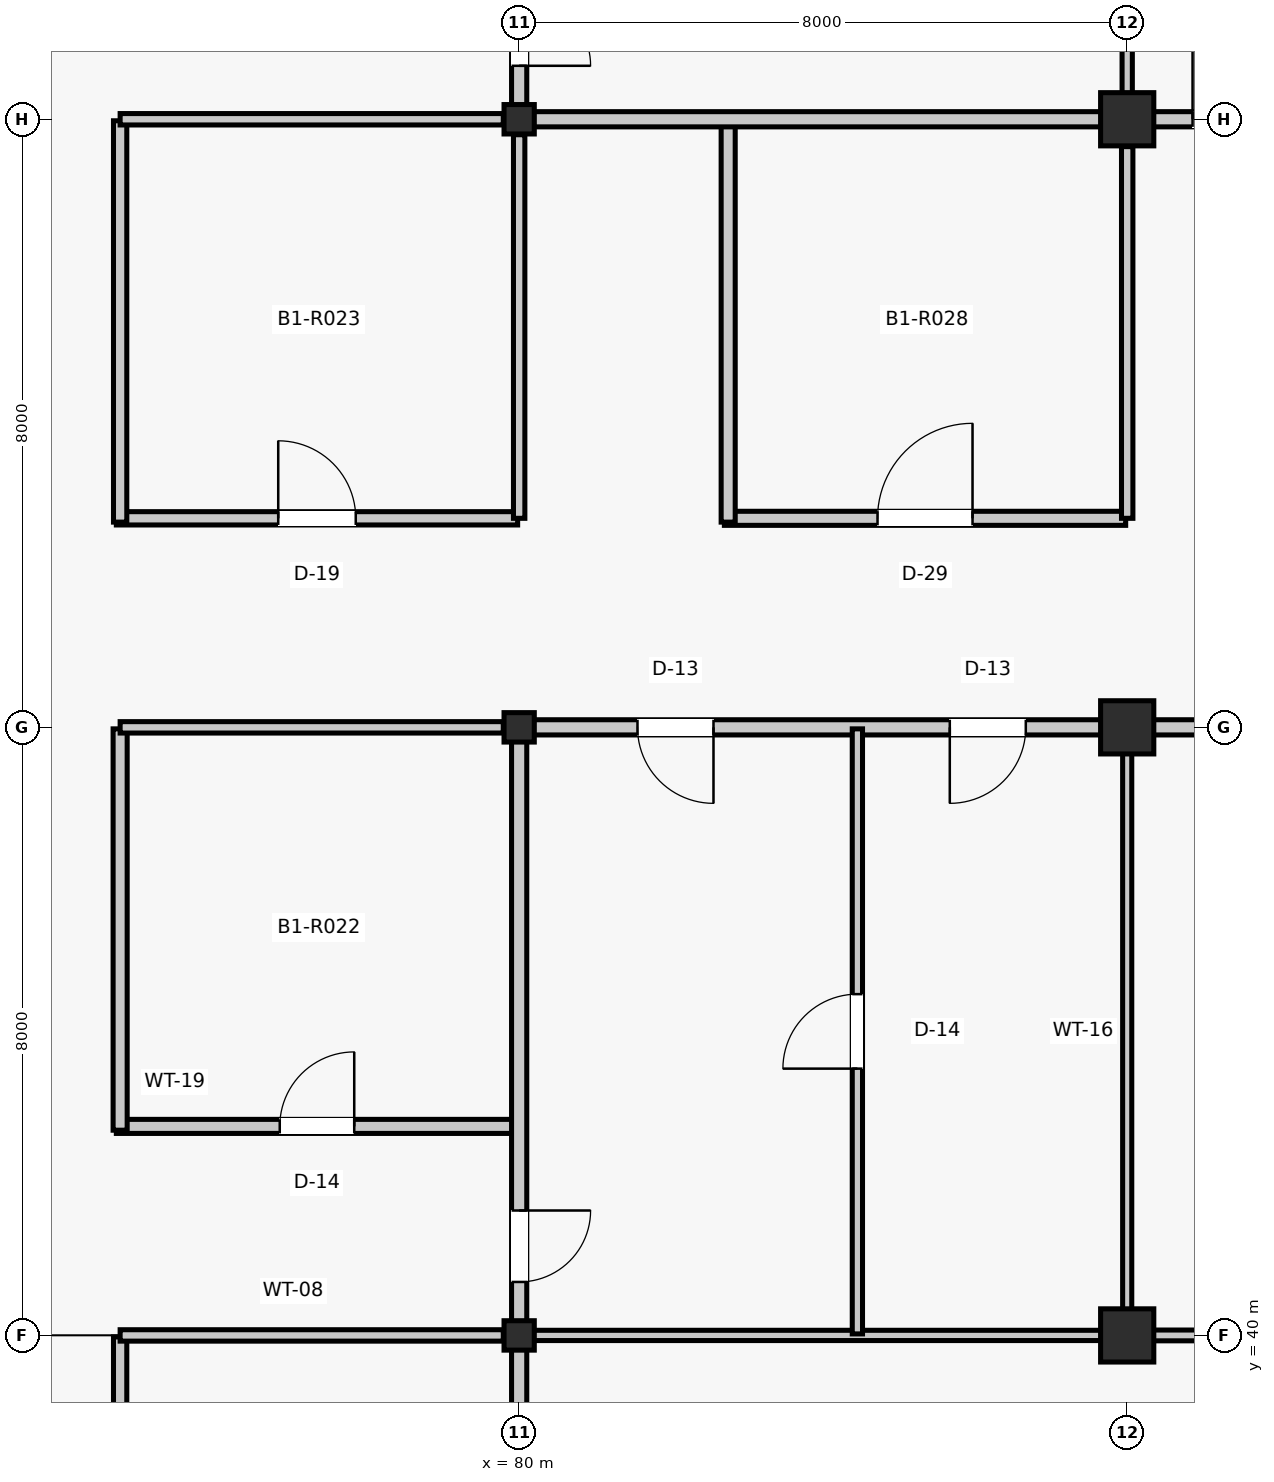
"""IFC4 building model, lengths in metres.
Left out: names, types, materials, properties, quantities, classifications, styles, units other than length and angle.
Written with IfcOpenShell. Run it as: python <this file> out.ifc"""

import sys

from ifc_helpers import new_model, si_unit, direction, frame, frame_2d, origin, origin_2d, place, context, subcontext, project, spatial, rectangle, i_section, extrude, element, fill, save


model = new_model("IFC4")
c1 = context("Model", 3, precision=1e-05, world=origin(), true_north=direction((0.0, 1.0)))
c2 = subcontext(c1, "Body", "Model", "MODEL_VIEW")
j1 = project(units=[si_unit("LENGTHUNIT", "METRE"), si_unit("PLANEANGLEUNIT", "RADIAN")], contexts=[c1])
p1 = place(None, origin())
s1 = spatial("IfcSite", under=j1, at=p1, CompositionType="ELEMENT")
p2 = place(p1, origin())
s2 = spatial("IfcBuilding", under=s1, at=p2, CompositionType="ELEMENT")
p3 = place(p2, frame((0.0, 0.0, -4.29)))
s3 = spatial("IfcBuildingStorey", under=s2, at=p3, CompositionType="ELEMENT", Elevation=-4.29)
for number, where, z_axis, x_axis in (
    (1, (80.0, 40.0, 0.0), (0.0, 0.0, 1.0), (1.0, 0.0, 0.0)),
    (2, (80.0, 48.0, 0.0), (0.0, 0.0, 1.0), (1.0, 0.0, 0.0)),
    (3, (80.0, 56.0, 0.0), (0.0, 0.0, 1.0), (1.0, 0.0, 0.0)),
):
    element("IfcColumn", number, at=place(p3, frame(where, z_axis=z_axis, x_axis=x_axis)), inside=s3, PredefinedType="COLUMN", context=c2, shape_type="SweptSolid", body=[
        extrude(i_section(OverallWidth=0.398, OverallDepth=0.387, WebThickness=0.021, FlangeThickness=0.033, FilletRadius=0.015, at=origin_2d()), origin(), (0.0, 0.0, 1.0), 4.29),
    ])
for number, where, z_axis, x_axis in (
    (4, (88.0, 40.0, 0.0), (0.0, 0.0, 1.0), (1.0, 0.0, 0.0)),
    (5, (88.0, 48.0, 0.0), (0.0, 0.0, 1.0), (1.0, 0.0, 0.0)),
    (6, (88.0, 56.0, 0.0), (0.0, 0.0, 1.0), (1.0, 0.0, 0.0)),
):
    element("IfcColumn", number, at=place(p3, frame(where, z_axis=z_axis, x_axis=x_axis)), inside=s3, PredefinedType="COLUMN", context=c2, shape_type="SweptSolid", body=[
        extrude(rectangle(XDim=0.7, YDim=0.7, at=origin_2d()), origin(), (0.0, 0.0, 1.0), 4.29),
    ])
p4 = place(p3, frame((74.75, 34.7, 0.0), z_axis=(0.0, 0.0, 1.0), x_axis=(0.0, 1.0, 0.0)))
e7 = element("IfcWall", 7, at=p4, inside=s3, PredefinedType="PARTITIONING", context=c2, shape_type="SweptSolid", body=[
    extrude(rectangle(XDim=5.28, YDim=0.175, at=frame_2d((2.64, 0.0))), origin(), (0.0, 0.0, 1.0), 3.326),
])
p5 = place(p3, frame((74.75, 40.0, 0.0), z_axis=(0.0, 0.0, 1.0), x_axis=(1.0, 0.0, 0.0)))
e8 = element("IfcWall", 8, at=p5, inside=s3, PredefinedType="PARTITIONING", context=c2, shape_type="SweptSolid", body=[
    extrude(rectangle(XDim=5.041, YDim=0.15, at=frame_2d((2.521, 0.0))), origin(), (0.0, 0.0, 1.0), 3.326),
])
p6 = place(p3, frame((74.7, 42.75, 0.0), z_axis=(0.0, 0.0, 1.0), x_axis=(1.0, 0.0, 0.0)))
e9 = element("IfcWall", 9, at=p6, inside=s3, PredefinedType="PARTITIONING", context=c2, shape_type="SweptSolid", body=[
    extrude(rectangle(XDim=5.28, YDim=0.185, at=frame_2d((2.64, 0.0))), origin(), (0.0, 0.0, 1.0), 3.461),
])
p7 = place(p6, frame((2.15, 0.0, 0.0)))
e10 = element("IfcOpeningElement", 10, at=p7, cuts=e9, PredefinedType="OPENING", context=c2, shape_type="SweptSolid", body=[
    extrude(rectangle(XDim=0.98, YDim=2.15, at=frame_2d((0.49, 1.075))), frame((0.0, 0.103, 0.0), z_axis=(0.0, -1.0, 0.0), x_axis=(1.0, 0.0, 0.0)), (0.0, 0.0, 1.0), 0.205),
])
p8 = place(p3, frame((74.75, 42.7, 0.0), z_axis=(0.0, 0.0, 1.0), x_axis=(0.0, 1.0, 0.0)))
e11 = element("IfcWall", 11, at=p8, inside=s3, PredefinedType="PARTITIONING", context=c2, shape_type="SweptSolid", body=[
    extrude(rectangle(XDim=5.28, YDim=0.185, at=frame_2d((2.64, 0.0))), origin(), (0.0, 0.0, 1.0), 3.394),
])
p9 = place(p3, frame((74.75, 48.0, 0.0), z_axis=(0.0, 0.0, 1.0), x_axis=(1.0, 0.0, 0.0)))
e12 = element("IfcWall", 12, at=p9, inside=s3, PredefinedType="PARTITIONING", context=c2, shape_type="SweptSolid", body=[
    extrude(rectangle(XDim=5.041, YDim=0.15, at=frame_2d((2.521, 0.0))), origin(), (0.0, 0.0, 1.0), 3.394),
])
p10 = place(p3, frame((74.7, 50.75, 0.0), z_axis=(0.0, 0.0, 1.0), x_axis=(1.0, 0.0, 0.0)))
e13 = element("IfcWall", 13, at=p10, inside=s3, PredefinedType="PARTITIONING", context=c2, shape_type="SweptSolid", body=[
    extrude(rectangle(XDim=5.28, YDim=0.175, at=frame_2d((2.64, 0.0))), origin(), (0.0, 0.0, 1.0), 3.393),
])
p11 = place(p10, frame((2.13, 0.0, 0.0)))
e14 = element("IfcOpeningElement", 14, at=p11, cuts=e13, PredefinedType="OPENING", context=c2, shape_type="SweptSolid", body=[
    extrude(rectangle(XDim=1.02, YDim=2.2, at=frame_2d((0.51, 1.1))), frame((0.0, 0.097, 0.0), z_axis=(0.0, -1.0, 0.0), x_axis=(1.0, 0.0, 0.0)), (0.0, 0.0, 1.0), 0.195),
])
p12 = place(p3, frame((74.75, 50.7, 0.0), z_axis=(0.0, 0.0, 1.0), x_axis=(0.0, 1.0, 0.0)))
e15 = element("IfcWall", 15, at=p12, inside=s3, PredefinedType="PARTITIONING", context=c2, shape_type="SweptSolid", body=[
    extrude(rectangle(XDim=5.28, YDim=0.175, at=frame_2d((2.64, 0.0))), origin(), (0.0, 0.0, 1.0), 3.317),
])
p13 = place(p3, frame((74.75, 56.0, 0.0), z_axis=(0.0, 0.0, 1.0), x_axis=(1.0, 0.0, 0.0)))
e16 = element("IfcWall", 16, at=p13, inside=s3, PredefinedType="PARTITIONING", context=c2, shape_type="SweptSolid", body=[
    extrude(rectangle(XDim=5.041, YDim=0.15, at=frame_2d((2.521, 0.0))), origin(), (0.0, 0.0, 1.0), 3.317),
])
p14 = place(p3, frame((80.0, 50.75, 0.0), z_axis=(0.0, 0.0, 1.0), x_axis=(0.0, 1.0, 0.0)))
e17 = element("IfcWall", 17, at=p14, inside=s3, PredefinedType="PARTITIONING", context=c2, shape_type="SweptSolid", body=[
    extrude(rectangle(XDim=5.046, YDim=0.15, at=frame_2d((2.523, 0.0))), origin(), (0.0, 0.0, 1.0), 3.393),
])
p15 = place(p3, frame((82.7, 50.75, 0.0), z_axis=(0.0, 0.0, 1.0), x_axis=(1.0, 0.0, 0.0)))
e18 = element("IfcWall", 18, at=p15, inside=s3, PredefinedType="PARTITIONING", context=c2, shape_type="SweptSolid", body=[
    extrude(rectangle(XDim=5.28, YDim=0.185, at=frame_2d((2.64, 0.0))), origin(), (0.0, 0.0, 1.0), 3.402),
])
p16 = place(p15, frame((2.015, 0.0, 0.0)))
e19 = element("IfcOpeningElement", 19, at=p16, cuts=e18, PredefinedType="OPENING", context=c2, shape_type="SweptSolid", body=[
    extrude(rectangle(XDim=1.25, YDim=2.18, at=frame_2d((0.625, 1.09))), frame((0.0, 0.103, 0.0), z_axis=(0.0, -1.0, 0.0), x_axis=(1.0, 0.0, 0.0)), (0.0, 0.0, 1.0), 0.205),
])
p17 = place(p3, frame((82.75, 50.7, 0.0), z_axis=(0.0, 0.0, 1.0), x_axis=(0.0, 1.0, 0.0)))
e20 = element("IfcWall", 20, at=p17, inside=s3, PredefinedType="PARTITIONING", context=c2, shape_type="SweptSolid", body=[
    extrude(rectangle(XDim=5.28, YDim=0.185, at=frame_2d((2.64, 0.0))), origin(), (0.0, 0.0, 1.0), 3.393),
])
p18 = place(p3, frame((88.0, 50.75, 0.0), z_axis=(0.0, 0.0, 1.0), x_axis=(0.0, 1.0, 0.0)))
e21 = element("IfcWall", 21, at=p18, inside=s3, PredefinedType="PARTITIONING", context=c2, shape_type="SweptSolid", body=[
    extrude(rectangle(XDim=4.89, YDim=0.15, at=frame_2d((2.445, 0.0))), origin(), (0.0, 0.0, 1.0), 3.402),
])
p19 = place(p3, frame((80.0, 32.184, 0.0), z_axis=(0.0, 0.0, 1.0), x_axis=(0.0, 1.0, 0.0)))
e22 = element("IfcWall", 22, at=p19, inside=s3, PredefinedType="PARTITIONING", context=c2, shape_type="SweptSolid", body=[
    extrude(rectangle(XDim=7.633, YDim=0.2, at=frame_2d((3.816, 0.0))), origin(), (0.0, 0.0, 1.0), 3.394),
])
p20 = place(p19, frame((0.52, 0.0, 0.0)))
e23 = element("IfcOpeningElement", 23, at=p20, cuts=e22, PredefinedType="OPENING", context=c2, shape_type="SweptSolid", body=[
    extrude(rectangle(XDim=0.94, YDim=2.12, at=frame_2d((0.47, 1.06))), frame((0.0, 0.11, 0.0), z_axis=(0.0, -1.0, 0.0), x_axis=(1.0, 0.0, 0.0)), (0.0, 0.0, 1.0), 0.22),
])
p21 = place(p3, frame((80.0, 40.184, 0.0), z_axis=(0.0, 0.0, 1.0), x_axis=(0.0, 1.0, 0.0)))
e24 = element("IfcWall", 24, at=p21, inside=s3, PredefinedType="PARTITIONING", context=c2, shape_type="SweptSolid", body=[
    extrude(rectangle(XDim=7.633, YDim=0.2, at=frame_2d((3.816, 0.0))), origin(), (0.0, 0.0, 1.0), 3.461),
])
p22 = place(p21, frame((0.52, 0.0, 0.0)))
e25 = element("IfcOpeningElement", 25, at=p22, cuts=e24, PredefinedType="OPENING", context=c2, shape_type="SweptSolid", body=[
    extrude(rectangle(XDim=0.94, YDim=2.12, at=frame_2d((0.47, 1.06))), frame((0.0, 0.11, 0.0), z_axis=(0.0, -1.0, 0.0), x_axis=(1.0, 0.0, 0.0)), (0.0, 0.0, 1.0), 0.22),
])
p23 = place(p3, frame((80.0, 56.184, 0.0), z_axis=(0.0, 0.0, 1.0), x_axis=(0.0, 1.0, 0.0)))
e26 = element("IfcWall", 26, at=p23, inside=s3, PredefinedType="PARTITIONING", context=c2, shape_type="SweptSolid", body=[
    extrude(rectangle(XDim=7.633, YDim=0.2, at=frame_2d((3.816, 0.0))), origin(), (0.0, 0.0, 1.0), 3.402),
])
p24 = place(p23, frame((0.52, 0.0, 0.0)))
e27 = element("IfcOpeningElement", 27, at=p24, cuts=e26, PredefinedType="OPENING", context=c2, shape_type="SweptSolid", body=[
    extrude(rectangle(XDim=0.94, YDim=2.12, at=frame_2d((0.47, 1.06))), frame((0.0, 0.11, 0.0), z_axis=(0.0, -1.0, 0.0), x_axis=(1.0, 0.0, 0.0)), (0.0, 0.0, 1.0), 0.22),
])
p25 = place(p3, frame((80.189, 40.0, 0.0), z_axis=(0.0, 0.0, 1.0), x_axis=(1.0, 0.0, 0.0)))
e28 = element("IfcWall", 28, at=p25, inside=s3, PredefinedType="PARTITIONING", context=c2, shape_type="SweptSolid", body=[
    extrude(rectangle(XDim=7.471, YDim=0.135, at=frame_2d((3.735, 0.0))), origin(), (0.0, 0.0, 1.0), 3.394),
])
p26 = place(p3, frame((88.0, 40.34, 0.0), z_axis=(0.0, 0.0, 1.0), x_axis=(0.0, 1.0, 0.0)))
e29 = element("IfcWall", 29, at=p26, inside=s3, PredefinedType="PARTITIONING", context=c2, shape_type="SweptSolid", body=[
    extrude(rectangle(XDim=7.32, YDim=0.12, at=frame_2d((3.66, 0.0))), origin(), (0.0, 0.0, 1.0), 3.393),
])
p27 = place(p3, frame((80.189, 48.0, 0.0), z_axis=(0.0, 0.0, 1.0), x_axis=(1.0, 0.0, 0.0)))
e30 = element("IfcWall", 30, at=p27, inside=s3, PredefinedType="PARTITIONING", context=c2, shape_type="SweptSolid", body=[
    extrude(rectangle(XDim=7.471, YDim=0.2, at=frame_2d((3.735, 0.0))), origin(), (0.0, 0.0, 1.0), 3.317),
])
p28 = place(p27, frame((1.368, 0.0, 0.0)))
e31 = element("IfcOpeningElement", 31, at=p28, cuts=e30, PredefinedType="OPENING", context=c2, shape_type="SweptSolid", body=[
    extrude(rectangle(XDim=1.0, YDim=2.15, at=frame_2d((0.5, 1.075))), frame((0.0, 0.11, 0.0), z_axis=(0.0, -1.0, 0.0), x_axis=(1.0, 0.0, 0.0)), (0.0, 0.0, 1.0), 0.22),
])
p29 = place(p27, frame((5.477, 0.0, 0.0)))
e32 = element("IfcOpeningElement", 32, at=p29, cuts=e30, PredefinedType="OPENING", context=c2, shape_type="SweptSolid", body=[
    extrude(rectangle(XDim=1.0, YDim=2.15, at=frame_2d((0.5, 1.075))), frame((0.0, 0.11, 0.0), z_axis=(0.0, -1.0, 0.0), x_axis=(1.0, 0.0, 0.0)), (0.0, 0.0, 1.0), 0.22),
])
p30 = place(p3, frame((80.189, 56.0, 0.0), z_axis=(0.0, 0.0, 1.0), x_axis=(1.0, 0.0, 0.0)))
e33 = element("IfcWall", 33, at=p30, inside=s3, PredefinedType="PARTITIONING", context=c2, shape_type="SweptSolid", body=[
    extrude(rectangle(XDim=7.471, YDim=0.2, at=frame_2d((3.735, 0.0))), origin(), (0.0, 0.0, 1.0), 3.393),
])
p31 = place(p3, frame((88.0, 56.34, 0.0), z_axis=(0.0, 0.0, 1.0), x_axis=(0.0, 1.0, 0.0)))
e34 = element("IfcWall", 34, at=p31, inside=s3, PredefinedType="PARTITIONING", context=c2, shape_type="SweptSolid", body=[
    extrude(rectangle(XDim=7.32, YDim=0.135, at=frame_2d((3.66, 0.0))), origin(), (0.0, 0.0, 1.0), 3.394),
])
p32 = place(p3, frame((88.34, 40.0, 0.0), z_axis=(0.0, 0.0, 1.0), x_axis=(1.0, 0.0, 0.0)))
e35 = element("IfcWall", 35, at=p32, inside=s3, PredefinedType="PARTITIONING", context=c2, shape_type="SweptSolid", body=[
    extrude(rectangle(XDim=7.471, YDim=0.142, at=frame_2d((3.735, 0.0))), origin(), (0.0, 0.0, 1.0), 3.317),
])
p33 = place(p3, frame((88.34, 48.0, 0.0), z_axis=(0.0, 0.0, 1.0), x_axis=(1.0, 0.0, 0.0)))
e36 = element("IfcWall", 36, at=p33, inside=s3, PredefinedType="PARTITIONING", context=c2, shape_type="SweptSolid", body=[
    extrude(rectangle(XDim=7.471, YDim=0.2, at=frame_2d((3.735, 0.0))), origin(), (0.0, 0.0, 1.0), 3.393),
])
p34 = place(p33, frame((3.085, 0.0, 0.0)))
e37 = element("IfcOpeningElement", 37, at=p34, cuts=e36, PredefinedType="OPENING", context=c2, shape_type="SweptSolid", body=[
    extrude(rectangle(XDim=1.3, YDim=2.2, at=frame_2d((0.65, 1.1))), frame((0.0, 0.11, 0.0), z_axis=(0.0, -1.0, 0.0), x_axis=(1.0, 0.0, 0.0)), (0.0, 0.0, 1.0), 0.22),
])
p35 = place(p3, frame((88.34, 56.0, 0.0), z_axis=(0.0, 0.0, 1.0), x_axis=(1.0, 0.0, 0.0)))
e38 = element("IfcWall", 38, at=p35, inside=s3, PredefinedType="PARTITIONING", context=c2, shape_type="SweptSolid", body=[
    extrude(rectangle(XDim=7.471, YDim=0.2, at=frame_2d((3.735, 0.0))), origin(), (0.0, 0.0, 1.0), 3.326),
])
p36 = place(p35, frame((0.52, 0.0, 0.0)))
e39 = element("IfcOpeningElement", 39, at=p36, cuts=e38, PredefinedType="OPENING", context=c2, shape_type="SweptSolid", body=[
    extrude(rectangle(XDim=0.94, YDim=2.12, at=frame_2d((0.47, 1.06))), frame((0.0, 0.11, 0.0), z_axis=(0.0, -1.0, 0.0), x_axis=(1.0, 0.0, 0.0)), (0.0, 0.0, 1.0), 0.22),
])
p37 = place(p3, frame((84.45, 40.02, 0.0), z_axis=(0.0, 0.0, 1.0), x_axis=(0.0, 1.0, 0.0)))
e40 = element("IfcWall", 40, at=p37, inside=s3, PredefinedType="PARTITIONING", context=c2, shape_type="SweptSolid", body=[
    extrude(rectangle(XDim=7.96, YDim=0.135, at=frame_2d((3.98, 0.0))), origin(), (0.0, 0.0, 1.0), 3.317),
])
p38 = place(p37, frame((3.49, 0.0, 0.0)))
e41 = element("IfcOpeningElement", 41, at=p38, cuts=e40, PredefinedType="OPENING", context=c2, shape_type="SweptSolid", body=[
    extrude(rectangle(XDim=0.98, YDim=2.15, at=frame_2d((0.49, 1.075))), frame((0.0, 0.077, 0.0), z_axis=(0.0, -1.0, 0.0), x_axis=(1.0, 0.0, 0.0)), (0.0, 0.0, 1.0), 0.155),
])
p39 = place(p7, origin())
e42 = element("IfcDoor", 42, at=p39, inside=s3, OperationType="SINGLE_SWING_RIGHT", PredefinedType="DOOR", context=c2, shape_type="SweptSolid", body=[
    extrude(rectangle(XDim=0.98, YDim=2.15, at=frame_2d((0.49, 1.075))), frame((0.0, 0.025, 0.0), z_axis=(0.0, -1.0, 0.0), x_axis=(1.0, 0.0, 0.0)), (0.0, 0.0, 1.0), 0.05),
])
fill(e10, e42)
p40 = place(p11, origin())
e43 = element("IfcDoor", 43, at=p40, inside=s3, OperationType="SINGLE_SWING_LEFT", PredefinedType="DOOR", context=c2, shape_type="SweptSolid", body=[
    extrude(rectangle(XDim=1.02, YDim=2.2, at=frame_2d((0.51, 1.1))), frame((0.0, 0.025, 0.0), z_axis=(0.0, -1.0, 0.0), x_axis=(1.0, 0.0, 0.0)), (0.0, 0.0, 1.0), 0.05),
])
fill(e14, e43)
p41 = place(p16, origin())
e44 = element("IfcDoor", 44, at=p41, inside=s3, OperationType="SINGLE_SWING_RIGHT", PredefinedType="DOOR", context=c2, shape_type="SweptSolid", body=[
    extrude(rectangle(XDim=1.25, YDim=2.18, at=frame_2d((0.625, 1.09))), frame((0.0, 0.025, 0.0), z_axis=(0.0, -1.0, 0.0), x_axis=(1.0, 0.0, 0.0)), (0.0, 0.0, 1.0), 0.05),
])
fill(e19, e44)
p42 = place(p22, frame((0.94, 0.0, 0.0), z_axis=(0.0, 0.0, 1.0), x_axis=(-1.0, 0.0, 0.0)))
e45 = element("IfcDoor", 45, at=p42, inside=s3, OperationType="SINGLE_SWING_RIGHT", PredefinedType="DOOR", context=c2, shape_type="SweptSolid", body=[
    extrude(rectangle(XDim=0.94, YDim=2.12, at=frame_2d((0.47, 1.06))), frame((0.0, 0.025, 0.0), z_axis=(0.0, -1.0, 0.0), x_axis=(1.0, 0.0, 0.0)), (0.0, 0.0, 1.0), 0.05),
])
fill(e25, e45)
p43 = place(p24, frame((0.94, 0.0, 0.0), z_axis=(0.0, 0.0, 1.0), x_axis=(-1.0, 0.0, 0.0)))
e46 = element("IfcDoor", 46, at=p43, inside=s3, OperationType="SINGLE_SWING_LEFT", PredefinedType="DOOR", context=c2, shape_type="SweptSolid", body=[
    extrude(rectangle(XDim=0.94, YDim=2.12, at=frame_2d((0.47, 1.06))), frame((0.0, 0.025, 0.0), z_axis=(0.0, -1.0, 0.0), x_axis=(1.0, 0.0, 0.0)), (0.0, 0.0, 1.0), 0.05),
])
fill(e27, e46)
p44 = place(p28, frame((1.0, 0.0, 0.0), z_axis=(0.0, 0.0, 1.0), x_axis=(-1.0, 0.0, 0.0)))
e47 = element("IfcDoor", 47, at=p44, inside=s3, OperationType="SINGLE_SWING_RIGHT", PredefinedType="DOOR", context=c2, shape_type="SweptSolid", body=[
    extrude(rectangle(XDim=1.0, YDim=2.15, at=frame_2d((0.5, 1.075))), frame((0.0, 0.025, 0.0), z_axis=(0.0, -1.0, 0.0), x_axis=(1.0, 0.0, 0.0)), (0.0, 0.0, 1.0), 0.05),
])
fill(e31, e47)
p45 = place(p29, frame((1.0, 0.0, 0.0), z_axis=(0.0, 0.0, 1.0), x_axis=(-1.0, 0.0, 0.0)))
e48 = element("IfcDoor", 48, at=p45, inside=s3, OperationType="SINGLE_SWING_LEFT", PredefinedType="DOOR", context=c2, shape_type="SweptSolid", body=[
    extrude(rectangle(XDim=1.0, YDim=2.15, at=frame_2d((0.5, 1.075))), frame((0.0, 0.025, 0.0), z_axis=(0.0, -1.0, 0.0), x_axis=(1.0, 0.0, 0.0)), (0.0, 0.0, 1.0), 0.05),
])
fill(e32, e48)
p46 = place(p36, origin())
e49 = element("IfcDoor", 49, at=p46, inside=s3, OperationType="SINGLE_SWING_LEFT", PredefinedType="DOOR", context=c2, shape_type="SweptSolid", body=[
    extrude(rectangle(XDim=0.94, YDim=2.12, at=frame_2d((0.47, 1.06))), frame((0.0, 0.025, 0.0), z_axis=(0.0, -1.0, 0.0), x_axis=(1.0, 0.0, 0.0)), (0.0, 0.0, 1.0), 0.05),
])
fill(e39, e49)
p47 = place(p38, origin())
e50 = element("IfcDoor", 50, at=p47, inside=s3, OperationType="SINGLE_SWING_LEFT", PredefinedType="DOOR", context=c2, shape_type="SweptSolid", body=[
    extrude(rectangle(XDim=0.98, YDim=2.15, at=frame_2d((0.49, 1.075))), frame((0.0, 0.025, 0.0), z_axis=(0.0, -1.0, 0.0), x_axis=(1.0, 0.0, 0.0)), (0.0, 0.0, 1.0), 0.05),
])
fill(e41, e50)
save(model, sys.argv[1])
